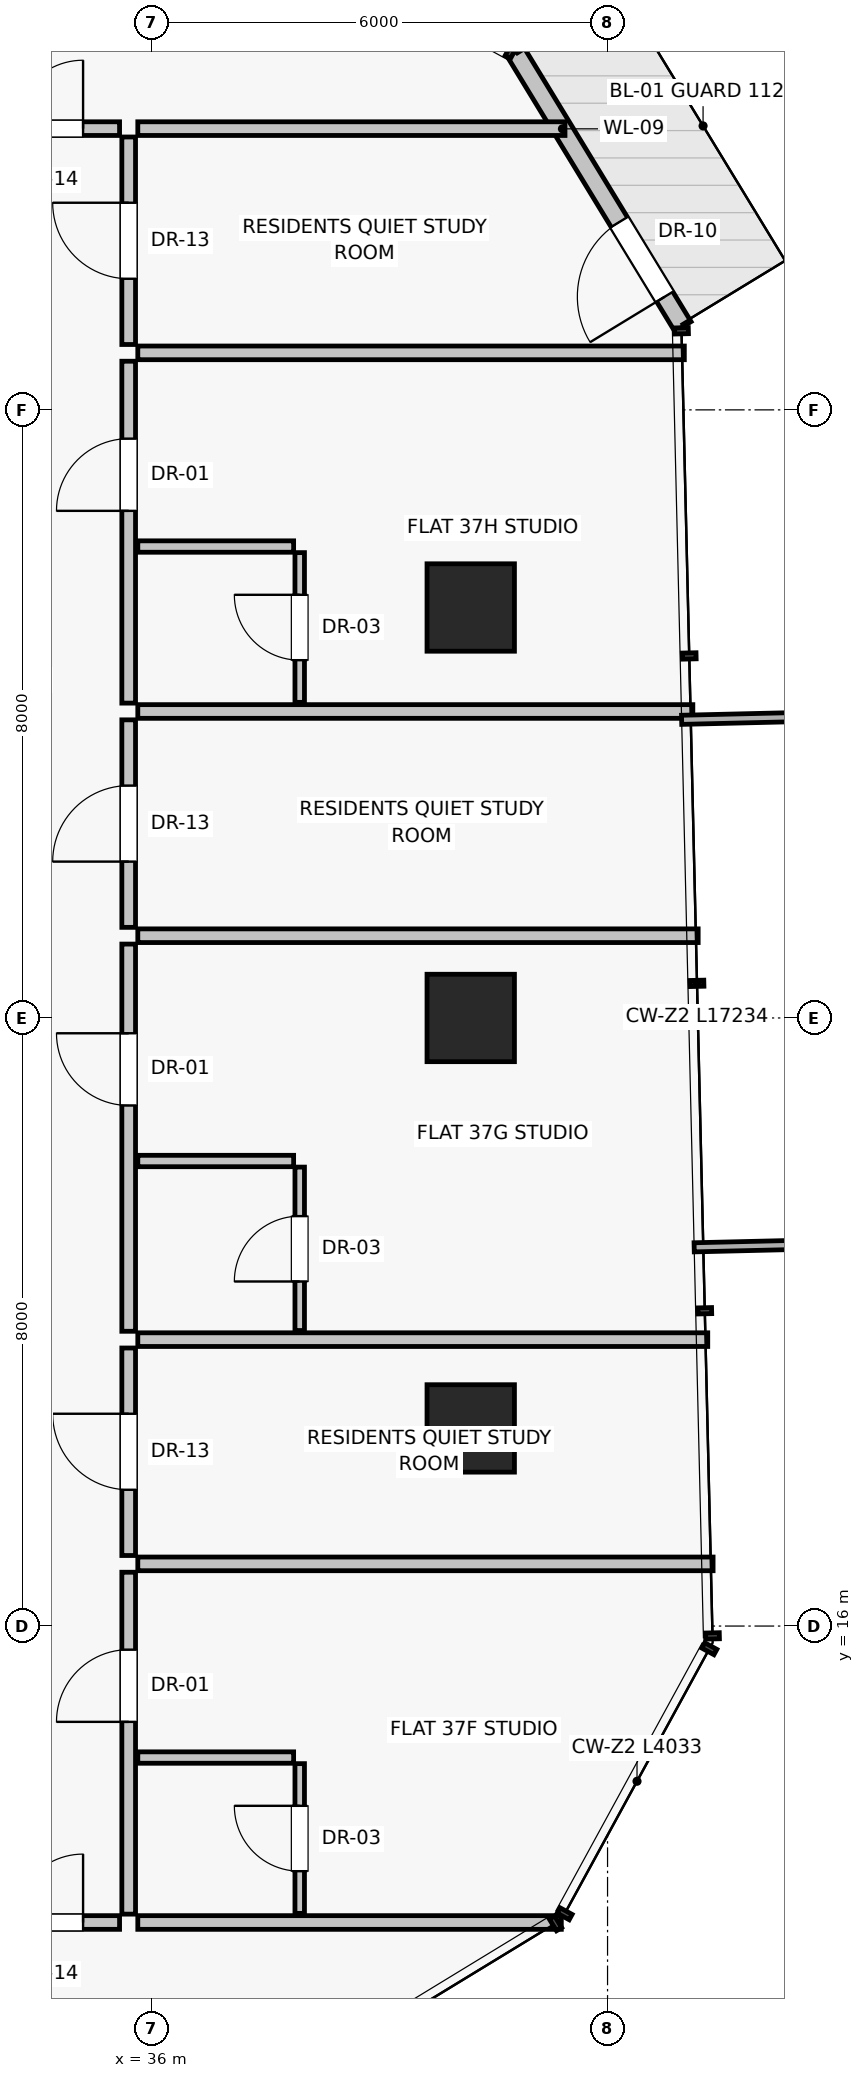
"""IFC4 building model, lengths in metres.
Left out: names, types, materials, properties, quantities, classifications, styles, units other than length and angle.
Written with IfcOpenShell. Run it as: python <this file> out.ifc"""

import sys

from ifc_helpers import new_model, si_unit, direction, frame, frame_2d, origin, origin_2d, place, context, subcontext, project, spatial, rectangle, extrude, source, transform, mapped, element, fill, save


model = new_model("IFC4")
c1 = context("Model", 3, precision=1e-05, world=origin(), true_north=direction((0.0, 1.0)))
c2 = subcontext(c1, "Body", "Model", "MODEL_VIEW")
j1 = project(units=[si_unit("LENGTHUNIT", "METRE"), si_unit("PLANEANGLEUNIT", "RADIAN")], contexts=[c1])
p1 = place(None, origin())
s1 = spatial("IfcSite", under=j1, at=p1, CompositionType="ELEMENT")
p2 = place(p1, origin())
s2 = spatial("IfcBuilding", under=s1, at=p2, CompositionType="ELEMENT")
p3 = place(p2, frame((0.0, 0.0, 132.75)))
s3 = spatial("IfcBuildingStorey", under=s2, at=p3, CompositionType="ELEMENT", Elevation=132.75)
for number, where, z_axis, x_axis in (
    (1, (40.2, 18.6, 0.0), (0.0, 0.0, 1.0), (1.0, 0.0, 0.0)),
    (2, (40.2, 24.0, 0.0), (0.0, 0.0, 1.0), (1.0, 0.0, 0.0)),
    (3, (40.2, 29.4, 0.0), (0.0, 0.0, 1.0), (1.0, 0.0, 0.0)),
):
    element("IfcColumn", number, at=place(p3, frame(where, z_axis=z_axis, x_axis=x_axis)), inside=s3, PredefinedType="COLUMN", context=c2, shape_type="SweptSolid", body=[
        extrude(rectangle(XDim=1.15, YDim=1.15, at=origin_2d()), origin(), (0.0, 0.0, 1.0), 3.25),
    ])
p4 = place(p3, frame((42.992, 33.096, 0.0), z_axis=(0.0, 0.0, 1.0), x_axis=(-0.520369515568, 0.85394119661, 0.0)))
e4 = element("IfcWall", 4, at=p4, inside=s3, PredefinedType="SOLIDWALL", context=c2, shape_type="SweptSolid", body=[
    extrude(rectangle(XDim=4.233, YDim=0.25, at=frame_2d((2.117, 0.0))), origin(), (0.0, 0.0, 1.0), 3.0),
])
p5 = place(p4, frame((0.46, 0.0, 0.0)))
e5 = element("IfcOpeningElement", 5, at=p5, cuts=e4, PredefinedType="OPENING", context=c2, shape_type="SweptSolid", body=[
    extrude(rectangle(XDim=1.15, YDim=2.25, at=frame_2d((0.575, 1.125))), frame((0.0, 0.135, 0.0), z_axis=(0.0, -1.0, 0.0), x_axis=(1.0, 0.0, 0.0)), (0.0, 0.0, 1.0), 0.27),
])
p6 = place(p3, frame((35.82, 12.1, 0.0), z_axis=(0.0, 0.0, 1.0), x_axis=(1.0, 0.0, 0.0)))
e6 = element("IfcWall", 6, at=p6, inside=s3, PredefinedType="PARTITIONING", context=c2, shape_type="SweptSolid", body=[
    extrude(rectangle(XDim=5.572, YDim=0.18, at=frame_2d((2.786, 0.0))), origin(), (0.0, 0.0, 1.0), 3.0),
])
p7 = place(p3, frame((35.82, 35.7, 0.0), z_axis=(0.0, 0.0, 1.0), x_axis=(1.0, 0.0, 0.0)))
e7 = element("IfcWall", 7, at=p7, inside=s3, PredefinedType="PARTITIONING", context=c2, shape_type="SweptSolid", body=[
    extrude(rectangle(XDim=5.62, YDim=0.18, at=frame_2d((2.81, 0.0))), origin(), (0.0, 0.0, 1.0), 3.0),
])
p8 = place(p3, frame((35.7, 16.928, 0.0), z_axis=(0.0, 0.0, 1.0), x_axis=(0.0, 1.0, 0.0)))
e8 = element("IfcWall", 8, at=p8, inside=s3, PredefinedType="PARTITIONING", context=c2, shape_type="SweptSolid", body=[
    extrude(rectangle(XDim=2.73, YDim=0.18, at=frame_2d((1.365, 0.0))), origin(), (0.0, 0.0, 1.0), 2.58),
])
p9 = place(p8, frame((0.865, 0.0, 0.0)))
e9 = element("IfcOpeningElement", 9, at=p9, cuts=e8, PredefinedType="OPENING", context=c2, shape_type="SweptSolid", body=[
    extrude(rectangle(XDim=1.0, YDim=2.01, at=frame_2d((0.5, 1.005))), frame((0.0, 0.1, 0.0), z_axis=(0.0, -1.0, 0.0), x_axis=(1.0, 0.0, 0.0)), (0.0, 0.0, 1.0), 0.2),
])
p10 = place(p3, frame((35.82, 16.818, 0.0), z_axis=(0.0, 0.0, 1.0), x_axis=(1.0, 0.0, 0.0)))
e10 = element("IfcWall", 10, at=p10, inside=s3, PredefinedType="PARTITIONING", context=c2, shape_type="SweptSolid", body=[
    extrude(rectangle(XDim=7.568, YDim=0.18, at=frame_2d((3.784, 0.0))), origin(), (0.0, 0.0, 1.0), 3.0),
])
p11 = place(p3, frame((35.7, 12.21, 0.0), z_axis=(0.0, 0.0, 1.0), x_axis=(0.0, 1.0, 0.0)))
e11 = element("IfcWall", 11, at=p11, inside=s3, PredefinedType="PARTITIONING", context=c2, shape_type="SweptSolid", body=[
    extrude(rectangle(XDim=4.498, YDim=0.18, at=frame_2d((2.249, 0.0))), origin(), (0.0, 0.0, 1.0), 3.0),
])
p12 = place(p11, frame((2.53, 0.0, 0.0)))
e12 = element("IfcOpeningElement", 12, at=p12, cuts=e11, PredefinedType="OPENING", context=c2, shape_type="SweptSolid", body=[
    extrude(rectangle(XDim=0.95, YDim=2.02, at=frame_2d((0.475, 1.01))), frame((0.0, 0.1, 0.0), z_axis=(0.0, -1.0, 0.0), x_axis=(1.0, 0.0, 0.0)), (0.0, 0.0, 1.0), 0.2),
])
p13 = place(p3, frame((35.82, 14.27, 0.0), z_axis=(0.0, 0.0, 1.0), x_axis=(1.0, 0.0, 0.0)))
e13 = element("IfcWall", 13, at=p13, inside=s3, PredefinedType="PARTITIONING", context=c2, shape_type="SweptSolid", body=[
    extrude(rectangle(XDim=2.05, YDim=0.15, at=frame_2d((1.025, 0.0))), origin(), (0.0, 0.0, 1.0), 3.0),
])
p14 = place(p3, frame((37.95, 12.22, 0.0), z_axis=(0.0, 0.0, 1.0), x_axis=(0.0, 1.0, 0.0)))
e14 = element("IfcWall", 14, at=p14, inside=s3, PredefinedType="PARTITIONING", context=c2, shape_type="SweptSolid", body=[
    extrude(rectangle(XDim=1.97, YDim=0.125, at=frame_2d((0.985, 0.0))), origin(), (0.0, 0.0, 1.0), 3.0),
])
p15 = place(p14, frame((0.555, 0.0, 0.0)))
e15 = element("IfcOpeningElement", 15, at=p15, cuts=e14, PredefinedType="OPENING", context=c2, shape_type="SweptSolid", body=[
    extrude(rectangle(XDim=0.86, YDim=2.01, at=frame_2d((0.43, 1.005))), frame((0.0, 0.073, 0.0), z_axis=(0.0, -1.0, 0.0), x_axis=(1.0, 0.0, 0.0)), (0.0, 0.0, 1.0), 0.145),
])
p16 = place(p3, frame((35.82, 19.768, 0.0), z_axis=(0.0, 0.0, 1.0), x_axis=(1.0, 0.0, 0.0)))
e16 = element("IfcWall", 16, at=p16, inside=s3, PredefinedType="PARTITIONING", context=c2, shape_type="SweptSolid", body=[
    extrude(rectangle(XDim=7.498, YDim=0.18, at=frame_2d((3.749, 0.0))), origin(), (0.0, 0.0, 1.0), 3.0),
])
p17 = place(p3, frame((35.7, 25.192, 0.0), z_axis=(0.0, 0.0, 1.0), x_axis=(0.0, 1.0, 0.0)))
e17 = element("IfcWall", 17, at=p17, inside=s3, PredefinedType="PARTITIONING", context=c2, shape_type="SweptSolid", body=[
    extrude(rectangle(XDim=2.73, YDim=0.18, at=frame_2d((1.365, 0.0))), origin(), (0.0, 0.0, 1.0), 2.58),
])
p18 = place(p17, frame((0.865, 0.0, 0.0)))
e18 = element("IfcOpeningElement", 18, at=p18, cuts=e17, PredefinedType="OPENING", context=c2, shape_type="SweptSolid", body=[
    extrude(rectangle(XDim=1.0, YDim=2.01, at=frame_2d((0.5, 1.005))), frame((0.0, 0.1, 0.0), z_axis=(0.0, -1.0, 0.0), x_axis=(1.0, 0.0, 0.0)), (0.0, 0.0, 1.0), 0.2),
])
p19 = place(p3, frame((35.82, 25.082, 0.0), z_axis=(0.0, 0.0, 1.0), x_axis=(1.0, 0.0, 0.0)))
e19 = element("IfcWall", 19, at=p19, inside=s3, PredefinedType="PARTITIONING", context=c2, shape_type="SweptSolid", body=[
    extrude(rectangle(XDim=7.372, YDim=0.18, at=frame_2d((3.686, 0.0))), origin(), (0.0, 0.0, 1.0), 3.0),
])
p20 = place(p3, frame((35.7, 19.878, 0.0), z_axis=(0.0, 0.0, 1.0), x_axis=(0.0, 1.0, 0.0)))
e20 = element("IfcWall", 20, at=p20, inside=s3, PredefinedType="PARTITIONING", context=c2, shape_type="SweptSolid", body=[
    extrude(rectangle(XDim=5.094, YDim=0.18, at=frame_2d((2.547, 0.0))), origin(), (0.0, 0.0, 1.0), 2.58),
])
p21 = place(p20, frame((2.971, 0.0, 0.0)))
e21 = element("IfcOpeningElement", 21, at=p21, cuts=e20, PredefinedType="OPENING", context=c2, shape_type="SweptSolid", body=[
    extrude(rectangle(XDim=0.95, YDim=2.02, at=frame_2d((0.475, 1.01))), frame((0.0, 0.1, 0.0), z_axis=(0.0, -1.0, 0.0), x_axis=(1.0, 0.0, 0.0)), (0.0, 0.0, 1.0), 0.2),
])
p22 = place(p3, frame((35.82, 22.118, 0.0), z_axis=(0.0, 0.0, 1.0), x_axis=(1.0, 0.0, 0.0)))
e22 = element("IfcWall", 22, at=p22, inside=s3, PredefinedType="PARTITIONING", context=c2, shape_type="SweptSolid", body=[
    extrude(rectangle(XDim=2.05, YDim=0.15, at=frame_2d((1.025, 0.0))), origin(), (0.0, 0.0, 1.0), 3.0),
])
p23 = place(p3, frame((37.95, 19.888, 0.0), z_axis=(0.0, 0.0, 1.0), x_axis=(0.0, 1.0, 0.0)))
e23 = element("IfcWall", 23, at=p23, inside=s3, PredefinedType="PARTITIONING", context=c2, shape_type="SweptSolid", body=[
    extrude(rectangle(XDim=2.15, YDim=0.125, at=frame_2d((1.075, 0.0))), origin(), (0.0, 0.0, 1.0), 3.0),
])
p24 = place(p23, frame((0.645, 0.0, 0.0)))
e24 = element("IfcOpeningElement", 24, at=p24, cuts=e23, PredefinedType="OPENING", context=c2, shape_type="SweptSolid", body=[
    extrude(rectangle(XDim=0.86, YDim=2.01, at=frame_2d((0.43, 1.005))), frame((0.0, 0.073, 0.0), z_axis=(0.0, -1.0, 0.0), x_axis=(1.0, 0.0, 0.0)), (0.0, 0.0, 1.0), 0.145),
])
p25 = place(p3, frame((35.82, 28.032, 0.0), z_axis=(0.0, 0.0, 1.0), x_axis=(1.0, 0.0, 0.0)))
e25 = element("IfcWall", 25, at=p25, inside=s3, PredefinedType="PARTITIONING", context=c2, shape_type="SweptSolid", body=[
    extrude(rectangle(XDim=7.302, YDim=0.18, at=frame_2d((3.651, 0.0))), origin(), (0.0, 0.0, 1.0), 3.0),
])
p26 = place(p3, frame((35.7, 32.86, 0.0), z_axis=(0.0, 0.0, 1.0), x_axis=(0.0, 1.0, 0.0)))
e26 = element("IfcWall", 26, at=p26, inside=s3, PredefinedType="PARTITIONING", context=c2, shape_type="SweptSolid", body=[
    extrude(rectangle(XDim=2.73, YDim=0.18, at=frame_2d((1.365, 0.0))), origin(), (0.0, 0.0, 1.0), 3.0),
])
p27 = place(p26, frame((0.865, 0.0, 0.0)))
e27 = element("IfcOpeningElement", 27, at=p27, cuts=e26, PredefinedType="OPENING", context=c2, shape_type="SweptSolid", body=[
    extrude(rectangle(XDim=1.0, YDim=2.01, at=frame_2d((0.5, 1.005))), frame((0.0, 0.1, 0.0), z_axis=(0.0, -1.0, 0.0), x_axis=(1.0, 0.0, 0.0)), (0.0, 0.0, 1.0), 0.2),
])
p28 = place(p3, frame((35.82, 32.75, 0.0), z_axis=(0.0, 0.0, 1.0), x_axis=(1.0, 0.0, 0.0)))
e28 = element("IfcWall", 28, at=p28, inside=s3, PredefinedType="PARTITIONING", context=c2, shape_type="SweptSolid", body=[
    extrude(rectangle(XDim=7.19, YDim=0.18, at=frame_2d((3.595, 0.0))), origin(), (0.0, 0.0, 1.0), 3.0),
])
p29 = place(p3, frame((35.7, 28.142, 0.0), z_axis=(0.0, 0.0, 1.0), x_axis=(0.0, 1.0, 0.0)))
e29 = element("IfcWall", 29, at=p29, inside=s3, PredefinedType="PARTITIONING", context=c2, shape_type="SweptSolid", body=[
    extrude(rectangle(XDim=4.498, YDim=0.18, at=frame_2d((2.249, 0.0))), origin(), (0.0, 0.0, 1.0), 2.58),
])
p30 = place(p29, frame((2.53, 0.0, 0.0)))
e30 = element("IfcOpeningElement", 30, at=p30, cuts=e29, PredefinedType="OPENING", context=c2, shape_type="SweptSolid", body=[
    extrude(rectangle(XDim=0.95, YDim=2.02, at=frame_2d((0.475, 1.01))), frame((0.0, 0.1, 0.0), z_axis=(0.0, -1.0, 0.0), x_axis=(1.0, 0.0, 0.0)), (0.0, 0.0, 1.0), 0.2),
])
p31 = place(p3, frame((35.82, 30.202, 0.0), z_axis=(0.0, 0.0, 1.0), x_axis=(1.0, 0.0, 0.0)))
e31 = element("IfcWall", 31, at=p31, inside=s3, PredefinedType="PARTITIONING", context=c2, shape_type="SweptSolid", body=[
    extrude(rectangle(XDim=2.05, YDim=0.15, at=frame_2d((1.025, 0.0))), origin(), (0.0, 0.0, 1.0), 2.378),
])
p32 = place(p3, frame((37.95, 28.152, 0.0), z_axis=(0.0, 0.0, 1.0), x_axis=(0.0, 1.0, 0.0)))
e32 = element("IfcWall", 32, at=p32, inside=s3, PredefinedType="PARTITIONING", context=c2, shape_type="SweptSolid", body=[
    extrude(rectangle(XDim=1.97, YDim=0.125, at=frame_2d((0.985, 0.0))), origin(), (0.0, 0.0, 1.0), 3.0),
])
p33 = place(p32, frame((0.555, 0.0, 0.0)))
e33 = element("IfcOpeningElement", 33, at=p33, cuts=e32, PredefinedType="OPENING", context=c2, shape_type="SweptSolid", body=[
    extrude(rectangle(XDim=0.86, YDim=2.01, at=frame_2d((0.43, 1.005))), frame((0.0, 0.073, 0.0), z_axis=(0.0, -1.0, 0.0), x_axis=(1.0, 0.0, 0.0)), (0.0, 0.0, 1.0), 0.145),
])
p34 = place(p3, frame((33.72, 12.1, 0.0), z_axis=(0.0, 0.0, 1.0), x_axis=(1.0, 0.0, 0.0)))
e34 = element("IfcWall", 34, at=p34, inside=s3, PredefinedType="PARTITIONING", context=c2, shape_type="SweptSolid", body=[
    extrude(rectangle(XDim=1.86, YDim=0.18, at=frame_2d((0.93, 0.0))), origin(), (0.0, 0.0, 1.0), 3.0),
])
p35 = place(p34, frame((0.48, 0.0, 0.0)))
e35 = element("IfcOpeningElement", 35, at=p35, cuts=e34, PredefinedType="OPENING", context=c2, shape_type="SweptSolid", body=[
    extrude(rectangle(XDim=0.9, YDim=2.01, at=frame_2d((0.45, 1.005))), frame((0.0, 0.1, 0.0), z_axis=(0.0, -1.0, 0.0), x_axis=(1.0, 0.0, 0.0)), (0.0, 0.0, 1.0), 0.2),
])
p36 = place(p3, frame((33.72, 35.7, 0.0), z_axis=(0.0, 0.0, 1.0), x_axis=(1.0, 0.0, 0.0)))
e36 = element("IfcWall", 36, at=p36, inside=s3, PredefinedType="PARTITIONING", context=c2, shape_type="SweptSolid", body=[
    extrude(rectangle(XDim=1.86, YDim=0.18, at=frame_2d((0.93, 0.0))), origin(), (0.0, 0.0, 1.0), 3.0),
])
p37 = place(p36, frame((0.48, 0.0, 0.0)))
e37 = element("IfcOpeningElement", 37, at=p37, cuts=e36, PredefinedType="OPENING", context=c2, shape_type="SweptSolid", body=[
    extrude(rectangle(XDim=0.9, YDim=2.01, at=frame_2d((0.45, 1.005))), frame((0.0, 0.1, 0.0), z_axis=(0.0, -1.0, 0.0), x_axis=(1.0, 0.0, 0.0)), (0.0, 0.0, 1.0), 0.2),
])
m1 = source(origin(), c2, "Body", "SweptSolid", [
    extrude(rectangle(XDim=1.15, YDim=2.25, at=frame_2d((0.575, 1.125))), frame((0.0, 0.025, 0.0), z_axis=(0.0, -1.0, 0.0), x_axis=(1.0, 0.0, 0.0)), (0.0, 0.0, 1.0), 0.05),
])
p38 = place(p5, frame((1.15, 0.0, 0.0), z_axis=(0.0, 0.0, 1.0), x_axis=(-1.0, 0.0, 0.0)))
e38 = element("IfcDoor", 38, at=p38, inside=s3, OperationType="SINGLE_SWING_LEFT", PredefinedType="DOOR", context=c2, shape_type="MappedRepresentation", body=[
    mapped(m1, transform((0.0, 0.0, 0.0), scale=1.0)),
])
fill(e5, e38)
m2 = source(origin(), c2, "Body", "SweptSolid", [
    extrude(rectangle(XDim=1.0, YDim=2.01, at=frame_2d((0.5, 1.005))), frame((0.0, 0.025, 0.0), z_axis=(0.0, -1.0, 0.0), x_axis=(1.0, 0.0, 0.0)), (0.0, 0.0, 1.0), 0.05),
])
p39 = place(p9, origin())
e39 = element("IfcDoor", 39, at=p39, inside=s3, OperationType="SINGLE_SWING_RIGHT", PredefinedType="DOOR", context=c2, shape_type="MappedRepresentation", body=[
    mapped(m2, transform((0.0, 0.0, 0.0), scale=1.0)),
])
fill(e9, e39)
m3 = source(origin(), c2, "Body", "SweptSolid", [
    extrude(rectangle(XDim=0.95, YDim=2.02, at=frame_2d((0.475, 1.01))), frame((0.0, 0.025, 0.0), z_axis=(0.0, -1.0, 0.0), x_axis=(1.0, 0.0, 0.0)), (0.0, 0.0, 1.0), 0.05),
])
p40 = place(p12, origin())
e40 = element("IfcDoor", 40, at=p40, inside=s3, OperationType="SINGLE_SWING_LEFT", PredefinedType="DOOR", context=c2, shape_type="MappedRepresentation", body=[
    mapped(m3, transform((0.0, 0.0, 0.0), scale=1.0)),
])
fill(e12, e40)
m4 = source(origin(), c2, "Body", "SweptSolid", [
    extrude(rectangle(XDim=0.86, YDim=2.01, at=frame_2d((0.43, 1.005))), frame((0.0, 0.025, 0.0), z_axis=(0.0, -1.0, 0.0), x_axis=(1.0, 0.0, 0.0)), (0.0, 0.0, 1.0), 0.05),
])
p41 = place(p15, origin())
e41 = element("IfcDoor", 41, at=p41, inside=s3, OperationType="SINGLE_SWING_RIGHT", PredefinedType="DOOR", context=c2, shape_type="MappedRepresentation", body=[
    mapped(m4, transform((0.0, 0.0, 0.0), scale=1.0)),
])
fill(e15, e41)
p42 = place(p18, origin())
e42 = element("IfcDoor", 42, at=p42, inside=s3, OperationType="SINGLE_SWING_LEFT", PredefinedType="DOOR", context=c2, shape_type="MappedRepresentation", body=[
    mapped(m2, transform((0.0, 0.0, 0.0), scale=1.0)),
])
fill(e18, e42)
p43 = place(p21, origin())
e43 = element("IfcDoor", 43, at=p43, inside=s3, OperationType="SINGLE_SWING_RIGHT", PredefinedType="DOOR", context=c2, shape_type="MappedRepresentation", body=[
    mapped(m3, transform((0.0, 0.0, 0.0), scale=1.0)),
])
fill(e21, e43)
p44 = place(p24, origin())
e44 = element("IfcDoor", 44, at=p44, inside=s3, OperationType="SINGLE_SWING_LEFT", PredefinedType="DOOR", context=c2, shape_type="MappedRepresentation", body=[
    mapped(m4, transform((0.0, 0.0, 0.0), scale=1.0)),
])
fill(e24, e44)
p45 = place(p27, origin())
e45 = element("IfcDoor", 45, at=p45, inside=s3, OperationType="SINGLE_SWING_RIGHT", PredefinedType="DOOR", context=c2, shape_type="MappedRepresentation", body=[
    mapped(m2, transform((0.0, 0.0, 0.0), scale=1.0)),
])
fill(e27, e45)
p46 = place(p30, origin())
e46 = element("IfcDoor", 46, at=p46, inside=s3, OperationType="SINGLE_SWING_LEFT", PredefinedType="DOOR", context=c2, shape_type="MappedRepresentation", body=[
    mapped(m3, transform((0.0, 0.0, 0.0), scale=1.0)),
])
fill(e30, e46)
p47 = place(p33, origin())
e47 = element("IfcDoor", 47, at=p47, inside=s3, OperationType="SINGLE_SWING_RIGHT", PredefinedType="DOOR", context=c2, shape_type="MappedRepresentation", body=[
    mapped(m4, transform((0.0, 0.0, 0.0), scale=1.0)),
])
fill(e33, e47)
m5 = source(origin(), c2, "Body", "SweptSolid", [
    extrude(rectangle(XDim=0.9, YDim=2.01, at=frame_2d((0.45, 1.005))), frame((0.0, 0.025, 0.0), z_axis=(0.0, -1.0, 0.0), x_axis=(1.0, 0.0, 0.0)), (0.0, 0.0, 1.0), 0.05),
])
p48 = place(p35, origin())
e48 = element("IfcDoor", 48, at=p48, inside=s3, OperationType="SINGLE_SWING_RIGHT", PredefinedType="DOOR", context=c2, shape_type="MappedRepresentation", body=[
    mapped(m5, transform((0.0, 0.0, 0.0), scale=1.0)),
])
fill(e35, e48)
p49 = place(p37, origin())
e49 = element("IfcDoor", 49, at=p49, inside=s3, OperationType="SINGLE_SWING_RIGHT", PredefinedType="DOOR", context=c2, shape_type="MappedRepresentation", body=[
    mapped(m5, transform((0.0, 0.0, 0.0), scale=1.0)),
])
fill(e37, e49)
save(model, sys.argv[1])
